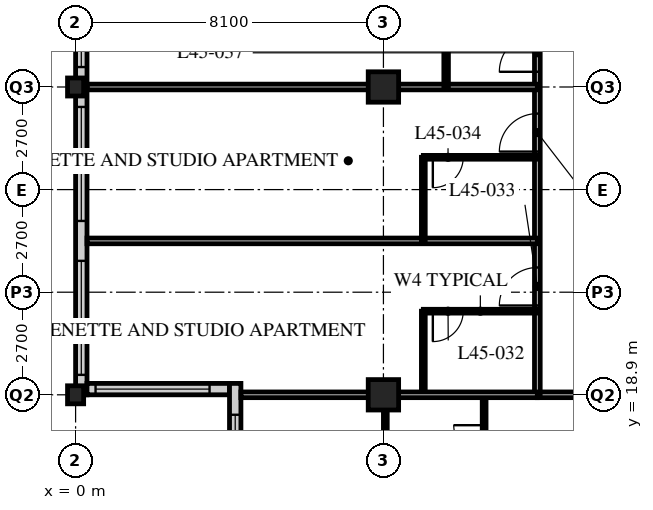
"""IFC4 building model, lengths in metres.
Left out: names, types, materials, properties, quantities, classifications, styles, units other than length and angle.
Written with IfcOpenShell. Run it as: python <this file> out.ifc"""

import sys

from ifc_helpers import new_model, si_unit, direction, frame, frame_2d, origin, origin_2d, place, context, subcontext, project, spatial, rectangle, hollow_rectangle, i_section, extrude, element, fill, save


model = new_model("IFC4")
c1 = context("Model", 3, precision=1e-05, world=origin(), true_north=direction((0.0, 1.0)))
c2 = subcontext(c1, "Body", "Model", "MODEL_VIEW")
j1 = project(units=[si_unit("LENGTHUNIT", "METRE"), si_unit("PLANEANGLEUNIT", "RADIAN")], contexts=[c1])
p1 = place(None, origin())
s1 = spatial("IfcSite", under=j1, at=p1, CompositionType="ELEMENT")
p2 = place(p1, origin())
s2 = spatial("IfcBuilding", under=s1, at=p2, CompositionType="ELEMENT")
p3 = place(p2, frame((0.0, 0.0, 177.6)))
s3 = spatial("IfcBuildingStorey", under=s2, at=p3, CompositionType="ELEMENT", Elevation=177.6)
for number, where, z_axis, x_axis in (
    (1, (0.0, 18.9, 0.0), (0.0, 0.0, 1.0), (1.0, 0.0, 0.0)),
    (2, (0.0, 27.0, 0.0), (0.0, 0.0, 1.0), (1.0, 0.0, 0.0)),
):
    element("IfcColumn", number, at=place(p3, frame(where, z_axis=z_axis, x_axis=x_axis)), inside=s3, PredefinedType="COLUMN", context=c2, shape_type="SweptSolid", body=[
        extrude(i_section(OverallWidth=0.424, OverallDepth=0.475, WebThickness=0.048, FlangeThickness=0.077, FilletRadius=0.015, at=origin_2d()), origin(), (0.0, 0.0, 1.0), 3.6),
    ])
for number, where, z_axis, x_axis in (
    (3, (8.1, 18.9, 0.0), (0.0, 0.0, 1.0), (1.0, 0.0, 0.0)),
    (4, (8.1, 27.0, 0.0), (0.0, 0.0, 1.0), (1.0, 0.0, 0.0)),
):
    element("IfcColumn", number, at=place(p3, frame(where, z_axis=z_axis, x_axis=x_axis)), inside=s3, PredefinedType="COLUMN", context=c2, shape_type="SweptSolid", body=[
        extrude(hollow_rectangle(XDim=0.8, YDim=0.8, WallThickness=0.08, at=origin_2d()), origin(), (0.0, 0.0, 1.0), 3.6),
    ])
p4 = place(p3, frame((0.15, 51.0, 0.0), z_axis=(0.0, 0.0, 1.0), x_axis=(0.0, -1.0, 0.0)))
e5 = element("IfcWall", 5, at=p4, inside=s3, PredefinedType="SOLIDWALL", context=c2, shape_type="SweptSolid", body=[
    extrude(rectangle(XDim=32.1, YDim=0.3, at=frame_2d((16.05, 0.0))), origin(), (0.0, 0.0, 1.0), 3.39),
])
p5 = place(p4, frame((0.225, 0.0, 0.6)))
e6 = element("IfcOpeningElement", 6, at=p5, cuts=e5, PredefinedType="OPENING", context=c2, shape_type="SweptSolid", body=[
    extrude(rectangle(XDim=3.0, YDim=2.4, at=frame_2d((1.5, 1.2))), frame((0.0, 0.16, 0.0), z_axis=(0.0, -1.0, 0.0), x_axis=(1.0, 0.0, 0.0)), (0.0, 0.0, 1.0), 0.32),
])
p6 = place(p4, frame((4.275, 0.0, 0.6)))
e7 = element("IfcOpeningElement", 7, at=p6, cuts=e5, PredefinedType="OPENING", context=c2, shape_type="SweptSolid", body=[
    extrude(rectangle(XDim=3.0, YDim=2.4, at=frame_2d((1.5, 1.2))), frame((0.0, 0.16, 0.0), z_axis=(0.0, -1.0, 0.0), x_axis=(1.0, 0.0, 0.0)), (0.0, 0.0, 1.0), 0.32),
])
p7 = place(p4, frame((8.325, 0.0, 0.6)))
e8 = element("IfcOpeningElement", 8, at=p7, cuts=e5, PredefinedType="OPENING", context=c2, shape_type="SweptSolid", body=[
    extrude(rectangle(XDim=3.0, YDim=2.4, at=frame_2d((1.5, 1.2))), frame((0.0, 0.16, 0.0), z_axis=(0.0, -1.0, 0.0), x_axis=(1.0, 0.0, 0.0)), (0.0, 0.0, 1.0), 0.32),
])
p8 = place(p4, frame((12.375, 0.0, 0.6)))
e9 = element("IfcOpeningElement", 9, at=p8, cuts=e5, PredefinedType="OPENING", context=c2, shape_type="SweptSolid", body=[
    extrude(rectangle(XDim=3.0, YDim=2.4, at=frame_2d((1.5, 1.2))), frame((0.0, 0.16, 0.0), z_axis=(0.0, -1.0, 0.0), x_axis=(1.0, 0.0, 0.0)), (0.0, 0.0, 1.0), 0.32),
])
p9 = place(p4, frame((16.425, 0.0, 0.6)))
e10 = element("IfcOpeningElement", 10, at=p9, cuts=e5, PredefinedType="OPENING", context=c2, shape_type="SweptSolid", body=[
    extrude(rectangle(XDim=3.0, YDim=2.4, at=frame_2d((1.5, 1.2))), frame((0.0, 0.16, 0.0), z_axis=(0.0, -1.0, 0.0), x_axis=(1.0, 0.0, 0.0)), (0.0, 0.0, 1.0), 0.32),
])
p10 = place(p4, frame((20.475, 0.0, 0.6)))
e11 = element("IfcOpeningElement", 11, at=p10, cuts=e5, PredefinedType="OPENING", context=c2, shape_type="SweptSolid", body=[
    extrude(rectangle(XDim=3.0, YDim=2.4, at=frame_2d((1.5, 1.2))), frame((0.0, 0.16, 0.0), z_axis=(0.0, -1.0, 0.0), x_axis=(1.0, 0.0, 0.0)), (0.0, 0.0, 1.0), 0.32),
])
p11 = place(p4, frame((24.525, 0.0, 0.6)))
e12 = element("IfcOpeningElement", 12, at=p11, cuts=e5, PredefinedType="OPENING", context=c2, shape_type="SweptSolid", body=[
    extrude(rectangle(XDim=3.0, YDim=2.4, at=frame_2d((1.5, 1.2))), frame((0.0, 0.16, 0.0), z_axis=(0.0, -1.0, 0.0), x_axis=(1.0, 0.0, 0.0)), (0.0, 0.0, 1.0), 0.32),
])
p12 = place(p4, frame((28.575, 0.0, 0.6)))
e13 = element("IfcOpeningElement", 13, at=p12, cuts=e5, PredefinedType="OPENING", context=c2, shape_type="SweptSolid", body=[
    extrude(rectangle(XDim=3.0, YDim=2.4, at=frame_2d((1.5, 1.2))), frame((0.0, 0.16, 0.0), z_axis=(0.0, -1.0, 0.0), x_axis=(1.0, 0.0, 0.0)), (0.0, 0.0, 1.0), 0.32),
])
p13 = place(p3, frame((0.3, 19.05, 0.0), z_axis=(0.0, 0.0, 1.0), x_axis=(1.0, 0.0, 0.0)))
e14 = element("IfcWall", 14, at=p13, inside=s3, PredefinedType="SOLIDWALL", context=c2, shape_type="SweptSolid", body=[
    extrude(rectangle(XDim=3.75, YDim=0.3, at=frame_2d((1.875, 0.0))), origin(), (0.0, 0.0, 1.0), 3.39),
])
p14 = place(p13, frame((0.225, 0.0, 0.6)))
e15 = element("IfcOpeningElement", 15, at=p14, cuts=e14, PredefinedType="OPENING", context=c2, shape_type="SweptSolid", body=[
    extrude(rectangle(XDim=3.0, YDim=2.0, at=frame_2d((1.5, 1.0))), frame((0.0, 0.16, 0.0), z_axis=(0.0, -1.0, 0.0), x_axis=(1.0, 0.0, 0.0)), (0.0, 0.0, 1.0), 0.32),
])
p15 = place(p3, frame((4.2, 19.2, 0.0), z_axis=(0.0, 0.0, 1.0), x_axis=(0.0, -1.0, 0.0)))
e16 = element("IfcWall", 16, at=p15, inside=s3, PredefinedType="SOLIDWALL", context=c2, shape_type="SweptSolid", body=[
    extrude(rectangle(XDim=4.35, YDim=0.3, at=frame_2d((2.175, 0.0))), origin(), (0.0, 0.0, 1.0), 3.39),
])
p16 = place(p15, frame((0.825, 0.0, 0.6)))
e17 = element("IfcOpeningElement", 17, at=p16, cuts=e16, PredefinedType="OPENING", context=c2, shape_type="SweptSolid", body=[
    extrude(rectangle(XDim=3.0, YDim=2.0, at=frame_2d((1.5, 1.0))), frame((0.0, 0.16, 0.0), z_axis=(0.0, -1.0, 0.0), x_axis=(1.0, 0.0, 0.0)), (0.0, 0.0, 1.0), 0.32),
])
p17 = place(p3, frame((12.15, 18.9, 0.0), z_axis=(0.0, 0.0, 1.0), x_axis=(1.0, 0.0, 0.0)))
e18 = element("IfcWall", 18, at=p17, inside=s3, PredefinedType="PARTITIONING", context=c2, shape_type="SweptSolid", body=[
    extrude(rectangle(XDim=32.4, YDim=0.15, at=frame_2d((16.2, 0.0))), origin(), (0.0, 0.0, 1.0), 2.778),
])
p18 = place(p17, frame((6.4, 0.0, 0.0)))
e19 = element("IfcOpeningElement", 19, at=p18, cuts=e18, PredefinedType="OPENING", context=c2, shape_type="SweptSolid", body=[
    extrude(rectangle(XDim=1.0, YDim=2.1, at=frame_2d((0.5, 1.05))), frame((0.0, 0.085, 0.0), z_axis=(0.0, -1.0, 0.0), x_axis=(1.0, 0.0, 0.0)), (0.0, 0.0, 1.0), 0.17),
])
p19 = place(p17, frame((8.8, 0.0, 0.0)))
e20 = element("IfcOpeningElement", 20, at=p19, cuts=e18, PredefinedType="OPENING", context=c2, shape_type="SweptSolid", body=[
    extrude(rectangle(XDim=1.0, YDim=2.1, at=frame_2d((0.5, 1.05))), frame((0.0, 0.085, 0.0), z_axis=(0.0, -1.0, 0.0), x_axis=(1.0, 0.0, 0.0)), (0.0, 0.0, 1.0), 0.17),
])
p20 = place(p17, frame((13.05, 0.0, 0.0)))
e21 = element("IfcOpeningElement", 21, at=p20, cuts=e18, PredefinedType="OPENING", context=c2, shape_type="SweptSolid", body=[
    extrude(rectangle(XDim=1.0, YDim=2.1, at=frame_2d((0.5, 1.05))), frame((0.0, 0.085, 0.0), z_axis=(0.0, -1.0, 0.0), x_axis=(1.0, 0.0, 0.0)), (0.0, 0.0, 1.0), 0.17),
])
p21 = place(p17, frame((22.6, 0.0, 0.0)))
e22 = element("IfcOpeningElement", 22, at=p21, cuts=e18, PredefinedType="OPENING", context=c2, shape_type="SweptSolid", body=[
    extrude(rectangle(XDim=1.0, YDim=2.1, at=frame_2d((0.5, 1.05))), frame((0.0, 0.085, 0.0), z_axis=(0.0, -1.0, 0.0), x_axis=(1.0, 0.0, 0.0)), (0.0, 0.0, 1.0), 0.17),
])
p22 = place(p17, frame((25.0, 0.0, 0.0)))
e23 = element("IfcOpeningElement", 23, at=p22, cuts=e18, PredefinedType="OPENING", context=c2, shape_type="SweptSolid", body=[
    extrude(rectangle(XDim=1.0, YDim=2.1, at=frame_2d((0.5, 1.05))), frame((0.0, 0.085, 0.0), z_axis=(0.0, -1.0, 0.0), x_axis=(1.0, 0.0, 0.0)), (0.0, 0.0, 1.0), 0.17),
])
p23 = place(p17, frame((1.525, 0.0, 0.0)))
e24 = element("IfcOpeningElement", 24, at=p23, cuts=e18, PredefinedType="OPENING", context=c2, shape_type="SweptSolid", body=[
    extrude(rectangle(XDim=1.0, YDim=2.1, at=frame_2d((0.5, 1.05))), frame((0.0, 0.085, 0.0), z_axis=(0.0, -1.0, 0.0), x_axis=(1.0, 0.0, 0.0)), (0.0, 0.0, 1.0), 0.17),
])
p24 = place(p17, frame((29.875, 0.0, 0.0)))
e25 = element("IfcOpeningElement", 25, at=p24, cuts=e18, PredefinedType="OPENING", context=c2, shape_type="SweptSolid", body=[
    extrude(rectangle(XDim=1.0, YDim=2.1, at=frame_2d((0.5, 1.05))), frame((0.0, 0.085, 0.0), z_axis=(0.0, -1.0, 0.0), x_axis=(1.0, 0.0, 0.0)), (0.0, 0.0, 1.0), 0.17),
])
p25 = place(p3, frame((12.15, 18.9, 0.0), z_axis=(0.0, 0.0, 1.0), x_axis=(0.0, 1.0, 0.0)))
e26 = element("IfcWall", 26, at=p25, inside=s3, PredefinedType="PARTITIONING", context=c2, shape_type="SweptSolid", body=[
    extrude(rectangle(XDim=24.3, YDim=0.15, at=frame_2d((12.15, 0.0))), origin(), (0.0, 0.0, 1.0), 3.39),
])
p26 = place(p25, frame((2.35, 0.0, 0.0)))
e27 = element("IfcOpeningElement", 27, at=p26, cuts=e26, PredefinedType="OPENING", context=c2, shape_type="SweptSolid", body=[
    extrude(rectangle(XDim=1.0, YDim=2.1, at=frame_2d((0.5, 1.05))), frame((0.0, 0.085, 0.0), z_axis=(0.0, -1.0, 0.0), x_axis=(1.0, 0.0, 0.0)), (0.0, 0.0, 1.0), 0.17),
])
p27 = place(p25, frame((6.4, 0.0, 0.0)))
e28 = element("IfcOpeningElement", 28, at=p27, cuts=e26, PredefinedType="OPENING", context=c2, shape_type="SweptSolid", body=[
    extrude(rectangle(XDim=1.0, YDim=2.1, at=frame_2d((0.5, 1.05))), frame((0.0, 0.085, 0.0), z_axis=(0.0, -1.0, 0.0), x_axis=(1.0, 0.0, 0.0)), (0.0, 0.0, 1.0), 0.17),
])
p28 = place(p25, frame((8.5, 0.0, 0.0)))
e29 = element("IfcOpeningElement", 29, at=p28, cuts=e26, PredefinedType="OPENING", context=c2, shape_type="SweptSolid", body=[
    extrude(rectangle(XDim=1.0, YDim=2.1, at=frame_2d((0.5, 1.05))), frame((0.0, 0.085, 0.0), z_axis=(0.0, -1.0, 0.0), x_axis=(1.0, 0.0, 0.0)), (0.0, 0.0, 1.0), 0.17),
])
p29 = place(p25, frame((16.6, 0.0, 0.0)))
e30 = element("IfcOpeningElement", 30, at=p29, cuts=e26, PredefinedType="OPENING", context=c2, shape_type="SweptSolid", body=[
    extrude(rectangle(XDim=1.0, YDim=2.1, at=frame_2d((0.5, 1.05))), frame((0.0, 0.085, 0.0), z_axis=(0.0, -1.0, 0.0), x_axis=(1.0, 0.0, 0.0)), (0.0, 0.0, 1.0), 0.17),
])
p30 = place(p3, frame((9.15, 18.9, 0.0), z_axis=(0.0, 0.0, 1.0), x_axis=(0.0, 1.0, 0.0)))
e31 = element("IfcWall", 31, at=p30, inside=s3, PredefinedType="PARTITIONING", context=c2, shape_type="SweptSolid", body=[
    extrude(rectangle(XDim=2.2, YDim=0.1, at=frame_2d((1.1, 0.0))), origin(), (0.0, 0.0, 1.0), 3.39),
])
p31 = place(p3, frame((12.15, 21.1, 0.0), z_axis=(0.0, 0.0, 1.0), x_axis=(-1.0, 0.0, 0.0)))
e32 = element("IfcWall", 32, at=p31, inside=s3, PredefinedType="PARTITIONING", context=c2, shape_type="SweptSolid", body=[
    extrude(rectangle(XDim=3.0, YDim=0.1, at=frame_2d((1.5, 0.0))), origin(), (0.0, 0.0, 1.0), 3.39),
])
p32 = place(p31, frame((1.95, 0.0, 0.0)))
e33 = element("IfcOpeningElement", 33, at=p32, cuts=e32, PredefinedType="OPENING", context=c2, shape_type="SweptSolid", body=[
    extrude(rectangle(XDim=0.8, YDim=2.1, at=frame_2d((0.4, 1.05))), frame((0.0, 0.06, 0.0), z_axis=(0.0, -1.0, 0.0), x_axis=(1.0, 0.0, 0.0)), (0.0, 0.0, 1.0), 0.12),
])
p33 = place(p3, frame((12.15, 22.95, 0.0), z_axis=(0.0, 0.0, 1.0), x_axis=(-1.0, 0.0, 0.0)))
e34 = element("IfcWall", 34, at=p33, inside=s3, PredefinedType="PARTITIONING", context=c2, shape_type="SweptSolid", body=[
    extrude(rectangle(XDim=11.85, YDim=0.15, at=frame_2d((5.925, 0.0))), origin(), (0.0, 0.0, 1.0), 3.39),
])
p34 = place(p3, frame((9.15, 22.95, 0.0), z_axis=(0.0, 0.0, 1.0), x_axis=(0.0, 1.0, 0.0)))
e35 = element("IfcWall", 35, at=p34, inside=s3, PredefinedType="PARTITIONING", context=c2, shape_type="SweptSolid", body=[
    extrude(rectangle(XDim=2.2, YDim=0.1, at=frame_2d((1.1, 0.0))), origin(), (0.0, 0.0, 1.0), 3.39),
])
p35 = place(p3, frame((12.15, 25.15, 0.0), z_axis=(0.0, 0.0, 1.0), x_axis=(-1.0, 0.0, 0.0)))
e36 = element("IfcWall", 36, at=p35, inside=s3, PredefinedType="PARTITIONING", context=c2, shape_type="SweptSolid", body=[
    extrude(rectangle(XDim=3.0, YDim=0.1, at=frame_2d((1.5, 0.0))), origin(), (0.0, 0.0, 1.0), 3.39),
])
p36 = place(p35, frame((1.95, 0.0, 0.0)))
e37 = element("IfcOpeningElement", 37, at=p36, cuts=e36, PredefinedType="OPENING", context=c2, shape_type="SweptSolid", body=[
    extrude(rectangle(XDim=0.8, YDim=2.1, at=frame_2d((0.4, 1.05))), frame((0.0, 0.06, 0.0), z_axis=(0.0, -1.0, 0.0), x_axis=(1.0, 0.0, 0.0)), (0.0, 0.0, 1.0), 0.12),
])
p37 = place(p3, frame((12.15, 27.0, 0.0), z_axis=(0.0, 0.0, 1.0), x_axis=(-1.0, 0.0, 0.0)))
e38 = element("IfcWall", 38, at=p37, inside=s3, PredefinedType="PARTITIONING", context=c2, shape_type="SweptSolid", body=[
    extrude(rectangle(XDim=11.85, YDim=0.15, at=frame_2d((5.925, 0.0))), origin(), (0.0, 0.0, 1.0), 2.778),
])
p38 = place(p3, frame((9.75, 27.0, 0.0), z_axis=(0.0, 0.0, 1.0), x_axis=(0.0, 1.0, 0.0)))
e39 = element("IfcWall", 39, at=p38, inside=s3, PredefinedType="PARTITIONING", context=c2, shape_type="SweptSolid", body=[
    extrude(rectangle(XDim=16.2, YDim=0.12, at=frame_2d((8.1, 0.0))), origin(), (0.0, 0.0, 1.0), 3.39),
])
p39 = place(p38, frame((0.975, 0.0, 0.0)))
e40 = element("IfcOpeningElement", 40, at=p39, cuts=e39, PredefinedType="OPENING", context=c2, shape_type="SweptSolid", body=[
    extrude(rectangle(XDim=0.85, YDim=2.1, at=frame_2d((0.425, 1.05))), frame((0.0, 0.07, 0.0), z_axis=(0.0, -1.0, 0.0), x_axis=(1.0, 0.0, 0.0)), (0.0, 0.0, 1.0), 0.14),
])
p40 = place(p38, frame((4.375, 0.0, 0.0)))
e41 = element("IfcOpeningElement", 41, at=p40, cuts=e39, PredefinedType="OPENING", context=c2, shape_type="SweptSolid", body=[
    extrude(rectangle(XDim=0.85, YDim=2.1, at=frame_2d((0.425, 1.05))), frame((0.0, 0.07, 0.0), z_axis=(0.0, -1.0, 0.0), x_axis=(1.0, 0.0, 0.0)), (0.0, 0.0, 1.0), 0.14),
])
p41 = place(p38, frame((9.075, 0.0, 0.0)))
e42 = element("IfcOpeningElement", 42, at=p41, cuts=e39, PredefinedType="OPENING", context=c2, shape_type="SweptSolid", body=[
    extrude(rectangle(XDim=0.85, YDim=2.1, at=frame_2d((0.425, 1.05))), frame((0.0, 0.07, 0.0), z_axis=(0.0, -1.0, 0.0), x_axis=(1.0, 0.0, 0.0)), (0.0, 0.0, 1.0), 0.14),
])
p42 = place(p38, frame((12.475, 0.0, 0.0)))
e43 = element("IfcOpeningElement", 43, at=p42, cuts=e39, PredefinedType="OPENING", context=c2, shape_type="SweptSolid", body=[
    extrude(rectangle(XDim=0.85, YDim=2.1, at=frame_2d((0.425, 1.05))), frame((0.0, 0.07, 0.0), z_axis=(0.0, -1.0, 0.0), x_axis=(1.0, 0.0, 0.0)), (0.0, 0.0, 1.0), 0.14),
])
p43 = place(p3, frame((10.75, 18.9, 0.0), z_axis=(0.0, 0.0, 1.0), x_axis=(0.0, -1.0, 0.0)))
e44 = element("IfcWall", 44, at=p43, inside=s3, PredefinedType="PARTITIONING", context=c2, shape_type="SweptSolid", body=[
    extrude(rectangle(XDim=2.4, YDim=0.1, at=frame_2d((1.2, 0.0))), origin(), (0.0, 0.0, 1.0), 3.39),
])
p44 = place(p43, frame((0.8, 0.0, 0.0)))
e45 = element("IfcOpeningElement", 45, at=p44, cuts=e44, PredefinedType="OPENING", context=c2, shape_type="SweptSolid", body=[
    extrude(rectangle(XDim=0.8, YDim=2.1, at=frame_2d((0.4, 1.05))), frame((0.0, 0.06, 0.0), z_axis=(0.0, -1.0, 0.0), x_axis=(1.0, 0.0, 0.0)), (0.0, 0.0, 1.0), 0.12),
])
p45 = place(p3, frame((8.15, 18.9, 0.0), z_axis=(0.0, 0.0, 1.0), x_axis=(0.0, -1.0, 0.0)))
e46 = element("IfcWall", 46, at=p45, inside=s3, PredefinedType="PARTITIONING", context=c2, shape_type="SweptSolid", body=[
    extrude(rectangle(XDim=2.4, YDim=0.1, at=frame_2d((1.2, 0.0))), origin(), (0.0, 0.0, 1.0), 2.778),
])
p46 = place(p3, frame((4.35, 18.9, 0.0), z_axis=(0.0, 0.0, 1.0), x_axis=(1.0, 0.0, 0.0)))
e47 = element("IfcWall", 47, at=p46, inside=s3, PredefinedType="PARTITIONING", context=c2, shape_type="SweptSolid", body=[
    extrude(rectangle(XDim=7.8, YDim=0.15, at=frame_2d((3.9, 0.0))), origin(), (0.0, 0.0, 1.0), 2.778),
])
p47 = place(p10, origin())
e48 = element("IfcWindow", 48, at=p47, inside=s3, PartitioningType="SINGLE_PANEL", PredefinedType="WINDOW", context=c2, shape_type="SweptSolid", body=[
    extrude(rectangle(XDim=3.0, YDim=2.4, at=frame_2d((1.5, 1.2))), frame((0.0, 0.03, 0.0), z_axis=(0.0, -1.0, 0.0), x_axis=(1.0, 0.0, 0.0)), (0.0, 0.0, 1.0), 0.06),
])
fill(e11, e48)
p48 = place(p11, origin())
e49 = element("IfcWindow", 49, at=p48, inside=s3, PartitioningType="SINGLE_PANEL", PredefinedType="WINDOW", context=c2, shape_type="SweptSolid", body=[
    extrude(rectangle(XDim=3.0, YDim=2.4, at=frame_2d((1.5, 1.2))), frame((0.0, 0.03, 0.0), z_axis=(0.0, -1.0, 0.0), x_axis=(1.0, 0.0, 0.0)), (0.0, 0.0, 1.0), 0.06),
])
fill(e12, e49)
p49 = place(p12, origin())
e50 = element("IfcWindow", 50, at=p49, inside=s3, PartitioningType="SINGLE_PANEL", PredefinedType="WINDOW", context=c2, shape_type="SweptSolid", body=[
    extrude(rectangle(XDim=3.0, YDim=2.4, at=frame_2d((1.5, 1.2))), frame((0.0, 0.03, 0.0), z_axis=(0.0, -1.0, 0.0), x_axis=(1.0, 0.0, 0.0)), (0.0, 0.0, 1.0), 0.06),
])
fill(e13, e50)
p50 = place(p14, origin())
e51 = element("IfcWindow", 51, at=p50, inside=s3, PartitioningType="SINGLE_PANEL", PredefinedType="WINDOW", context=c2, shape_type="SweptSolid", body=[
    extrude(rectangle(XDim=3.0, YDim=2.0, at=frame_2d((1.5, 1.0))), frame((0.0, 0.03, 0.0), z_axis=(0.0, -1.0, 0.0), x_axis=(1.0, 0.0, 0.0)), (0.0, 0.0, 1.0), 0.06),
])
fill(e15, e51)
p51 = place(p16, origin())
e52 = element("IfcWindow", 52, at=p51, inside=s3, PartitioningType="SINGLE_PANEL", PredefinedType="WINDOW", context=c2, shape_type="SweptSolid", body=[
    extrude(rectangle(XDim=3.0, YDim=2.0, at=frame_2d((1.5, 1.0))), frame((0.0, 0.03, 0.0), z_axis=(0.0, -1.0, 0.0), x_axis=(1.0, 0.0, 0.0)), (0.0, 0.0, 1.0), 0.06),
])
fill(e17, e52)
p52 = place(p32, origin())
e53 = element("IfcDoor", 53, at=p52, inside=s3, OperationType="SINGLE_SWING_RIGHT", PredefinedType="DOOR", context=c2, shape_type="SweptSolid", body=[
    extrude(rectangle(XDim=0.8, YDim=2.1, at=frame_2d((0.4, 1.05))), frame((0.0, 0.025, 0.0), z_axis=(0.0, -1.0, 0.0), x_axis=(1.0, 0.0, 0.0)), (0.0, 0.0, 1.0), 0.05),
])
fill(e33, e53)
p53 = place(p26, origin())
e54 = element("IfcDoor", 54, at=p53, inside=s3, OperationType="SINGLE_SWING_LEFT", PredefinedType="DOOR", context=c2, shape_type="SweptSolid", body=[
    extrude(rectangle(XDim=1.0, YDim=2.1, at=frame_2d((0.5, 1.05))), frame((0.0, 0.025, 0.0), z_axis=(0.0, -1.0, 0.0), x_axis=(1.0, 0.0, 0.0)), (0.0, 0.0, 1.0), 0.05),
])
fill(e27, e54)
p54 = place(p36, origin())
e55 = element("IfcDoor", 55, at=p54, inside=s3, OperationType="SINGLE_SWING_RIGHT", PredefinedType="DOOR", context=c2, shape_type="SweptSolid", body=[
    extrude(rectangle(XDim=0.8, YDim=2.1, at=frame_2d((0.4, 1.05))), frame((0.0, 0.025, 0.0), z_axis=(0.0, -1.0, 0.0), x_axis=(1.0, 0.0, 0.0)), (0.0, 0.0, 1.0), 0.05),
])
fill(e37, e55)
p55 = place(p27, origin())
e56 = element("IfcDoor", 56, at=p55, inside=s3, OperationType="SINGLE_SWING_LEFT", PredefinedType="DOOR", context=c2, shape_type="SweptSolid", body=[
    extrude(rectangle(XDim=1.0, YDim=2.1, at=frame_2d((0.5, 1.05))), frame((0.0, 0.025, 0.0), z_axis=(0.0, -1.0, 0.0), x_axis=(1.0, 0.0, 0.0)), (0.0, 0.0, 1.0), 0.05),
])
fill(e28, e56)
p56 = place(p28, origin())
e57 = element("IfcDoor", 57, at=p56, inside=s3, OperationType="SINGLE_SWING_LEFT", PredefinedType="DOOR", context=c2, shape_type="SweptSolid", body=[
    extrude(rectangle(XDim=1.0, YDim=2.1, at=frame_2d((0.5, 1.05))), frame((0.0, 0.025, 0.0), z_axis=(0.0, -1.0, 0.0), x_axis=(1.0, 0.0, 0.0)), (0.0, 0.0, 1.0), 0.05),
])
fill(e29, e57)
p57 = place(p44, origin())
e58 = element("IfcDoor", 58, at=p57, inside=s3, OperationType="SINGLE_SWING_RIGHT", PredefinedType="DOOR", context=c2, shape_type="SweptSolid", body=[
    extrude(rectangle(XDim=0.8, YDim=2.1, at=frame_2d((0.4, 1.05))), frame((0.0, 0.025, 0.0), z_axis=(0.0, -1.0, 0.0), x_axis=(1.0, 0.0, 0.0)), (0.0, 0.0, 1.0), 0.05),
])
fill(e45, e58)
save(model, sys.argv[1])
